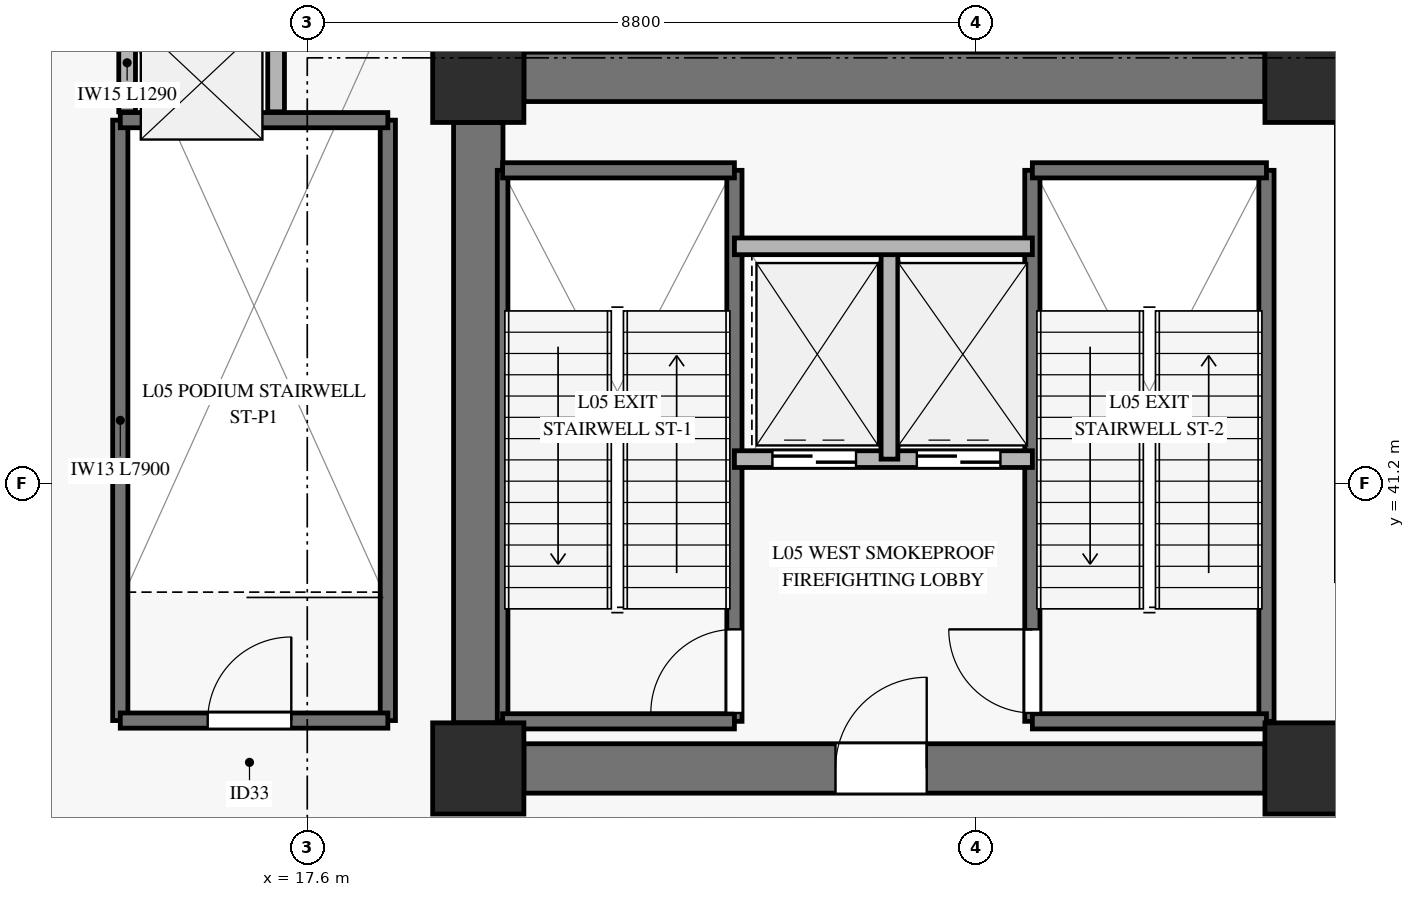
"""IFC4 building model, lengths in metres.
Left out: names, types, materials, properties, quantities, classifications, styles, units other than length and angle.
Written with IfcOpenShell. Run it as: python <this file> out.ifc"""

import sys

from ifc_helpers import new_model, si_unit, direction, frame, frame_2d, origin, origin_2d, place, context, subcontext, project, spatial, rectangle, extrude, source, transform, mapped, element, fill, save


model = new_model("IFC4")
c1 = context("Model", 3, precision=1e-05, world=origin(), true_north=direction((0.0, 1.0)))
c2 = subcontext(c1, "Body", "Model", "MODEL_VIEW")
j1 = project(units=[si_unit("LENGTHUNIT", "METRE"), si_unit("PLANEANGLEUNIT", "RADIAN")], contexts=[c1])
p1 = place(None, origin())
s1 = spatial("IfcSite", under=j1, at=p1, CompositionType="ELEMENT")
p2 = place(p1, origin())
s2 = spatial("IfcBuilding", under=s1, at=p2, CompositionType="ELEMENT")
p3 = place(p2, frame((0.0, 0.0, 20.2)))
s3 = spatial("IfcBuildingStorey", under=s2, at=p3, CompositionType="ELEMENT", Elevation=20.2)
m1 = source(origin(), c2, "Body", "SweptSolid", [
    extrude(rectangle(XDim=1.2, YDim=1.2, at=origin_2d()), origin(), (0.0, 0.0, 1.0), 4.98),
])
for number, where, z_axis, x_axis in (
    (1, (19.85, 37.45, 0.0), (0.0, 0.0, 1.0), (1.0, 0.0, 0.0)),
    (2, (19.85, 46.55, 0.0), (0.0, 0.0, 1.0), (1.0, 0.0, 0.0)),
    (3, (30.8, 37.45, 0.0), (0.0, 0.0, 1.0), (1.0, 0.0, 0.0)),
    (4, (30.8, 46.55, 0.0), (0.0, 0.0, 1.0), (1.0, 0.0, 0.0)),
):
    element("IfcColumn", number, at=place(p3, frame(where, z_axis=z_axis, x_axis=x_axis)), inside=s3, PredefinedType="PILASTER", context=c2, shape_type="MappedRepresentation", body=[
        mapped(m1, transform((0.0, 0.0, 0.0), x_axis=(1.0, 0.0, 0.0), y_axis=(0.0, 1.0, 0.0), z_axis=(0.0, 0.0, 1.0), scale=1.0)),
    ])
p4 = place(p3, frame((20.45, 46.55, 0.0), z_axis=(0.0, 0.0, 1.0), x_axis=(1.0, 0.0, 0.0)))
e5 = element("IfcWall", 5, at=p4, inside=s3, PredefinedType="SHEAR", context=c2, shape_type="SweptSolid", body=[
    extrude(rectangle(XDim=9.75, YDim=0.65, at=frame_2d((4.875, 0.0))), origin(), (0.0, 0.0, 1.0), 4.98),
])
p5 = place(p3, frame((20.45, 37.45, 0.0), z_axis=(0.0, 0.0, 1.0), x_axis=(1.0, 0.0, 0.0)))
e6 = element("IfcWall", 6, at=p5, inside=s3, PredefinedType="SHEAR", context=c2, shape_type="SweptSolid", body=[
    extrude(rectangle(XDim=9.75, YDim=0.65, at=frame_2d((4.875, 0.0))), origin(), (0.0, 0.0, 1.0), 4.98),
])
p6 = place(p5, frame((4.1, 0.0, 0.0)))
e7 = element("IfcOpeningElement", 7, at=p6, cuts=e6, PredefinedType="OPENING", context=c2, shape_type="SweptSolid", body=[
    extrude(rectangle(XDim=1.2, YDim=2.15, at=frame_2d((0.6, 1.075))), frame((0.0, 0.335, 0.0), z_axis=(0.0, -1.0, 0.0), x_axis=(1.0, 0.0, 0.0)), (0.0, 0.0, 1.0), 0.67),
])
p7 = place(p3, frame((19.85, 38.05, 0.0), z_axis=(0.0, 0.0, 1.0), x_axis=(0.0, 1.0, 0.0)))
e8 = element("IfcWall", 8, at=p7, inside=s3, PredefinedType="SHEAR", context=c2, shape_type="SweptSolid", body=[
    extrude(rectangle(XDim=7.9, YDim=0.65, at=frame_2d((3.95, 0.0))), origin(), (0.0, 0.0, 1.0), 4.98),
])
p8 = place(p3, frame((20.17, 38.07, 0.0), z_axis=(0.0, 0.0, 1.0), x_axis=(0.0, 1.0, 0.0)))
e9 = element("IfcWall", 9, at=p8, inside=s3, PredefinedType="SOLIDWALL", context=c2, shape_type="SweptSolid", body=[
    extrude(rectangle(XDim=7.25, YDim=0.14, at=frame_2d((3.625, 0.0))), origin(), (0.0, 0.0, 1.0), 5.2),
])
p9 = place(p3, frame((23.22, 38.07, 0.0), z_axis=(0.0, 0.0, 1.0), x_axis=(0.0, 1.0, 0.0)))
e10 = element("IfcWall", 10, at=p9, inside=s3, PredefinedType="SOLIDWALL", context=c2, shape_type="SweptSolid", body=[
    extrude(rectangle(XDim=7.25, YDim=0.2, at=frame_2d((3.625, 0.0))), origin(), (0.0, 0.0, 1.0), 5.2),
])
p10 = place(p9, frame((0.11, 0.0, 0.0)))
e11 = element("IfcOpeningElement", 11, at=p10, cuts=e10, PredefinedType="OPENING", context=c2, shape_type="SweptSolid", body=[
    extrude(rectangle(XDim=1.1, YDim=2.15, at=frame_2d((0.55, 1.075))), frame((0.0, 0.11, 0.0), z_axis=(0.0, -1.0, 0.0), x_axis=(1.0, 0.0, 0.0)), (0.0, 0.0, 1.0), 0.22),
])
for number, where, z_axis, x_axis in (
    (12, (20.17, 45.32, 0.0), (0.0, 0.0, 1.0), (1.0, 0.0, 0.0)),
    (13, (20.17, 38.07, 0.0), (0.0, 0.0, 1.0), (1.0, 0.0, 0.0)),
):
    element("IfcWall", number, at=place(p3, frame(where, z_axis=z_axis, x_axis=x_axis)), inside=s3, PredefinedType="SOLIDWALL", context=c2, shape_type="SweptSolid", body=[
        extrude(rectangle(XDim=3.05, YDim=0.2, at=frame_2d((1.525, 0.0))), origin(), (0.0, 0.0, 1.0), 5.2),
    ])
p11 = place(p3, frame((27.14, 38.07, 0.0), z_axis=(0.0, 0.0, 1.0), x_axis=(0.0, 1.0, 0.0)))
e14 = element("IfcWall", 14, at=p11, inside=s3, PredefinedType="SOLIDWALL", context=c2, shape_type="SweptSolid", body=[
    extrude(rectangle(XDim=7.25, YDim=0.2, at=frame_2d((3.625, 0.0))), origin(), (0.0, 0.0, 1.0), 5.2),
])
p12 = place(p11, frame((0.11, 0.0, 0.0)))
e15 = element("IfcOpeningElement", 15, at=p12, cuts=e14, PredefinedType="OPENING", context=c2, shape_type="SweptSolid", body=[
    extrude(rectangle(XDim=1.1, YDim=2.15, at=frame_2d((0.55, 1.075))), frame((0.0, 0.11, 0.0), z_axis=(0.0, -1.0, 0.0), x_axis=(1.0, 0.0, 0.0)), (0.0, 0.0, 1.0), 0.22),
])
p13 = place(p3, frame((30.22, 38.07, 0.0), z_axis=(0.0, 0.0, 1.0), x_axis=(0.0, 1.0, 0.0)))
e16 = element("IfcWall", 16, at=p13, inside=s3, PredefinedType="SOLIDWALL", context=c2, shape_type="SweptSolid", body=[
    extrude(rectangle(XDim=7.25, YDim=0.2, at=frame_2d((3.625, 0.0))), origin(), (0.0, 0.0, 1.0), 5.2),
])
for number, where, z_axis, x_axis in (
    (17, (27.14, 45.32, 0.0), (0.0, 0.0, 1.0), (1.0, 0.0, 0.0)),
    (18, (27.14, 38.07, 0.0), (0.0, 0.0, 1.0), (1.0, 0.0, 0.0)),
):
    element("IfcWall", number, at=place(p3, frame(where, z_axis=z_axis, x_axis=x_axis)), inside=s3, PredefinedType="SOLIDWALL", context=c2, shape_type="SweptSolid", body=[
        extrude(rectangle(XDim=3.08, YDim=0.2, at=frame_2d((1.54, 0.0))), origin(), (0.0, 0.0, 1.0), 5.2),
    ])
p14 = place(p3, frame((23.22, 41.52, 0.0), z_axis=(0.0, 0.0, 1.0), x_axis=(1.0, 0.0, 0.0)))
e19 = element("IfcWall", 19, at=p14, inside=s3, PredefinedType="SOLIDWALL", context=c2, shape_type="SweptSolid", body=[
    extrude(rectangle(XDim=3.92, YDim=0.22, at=frame_2d((1.96, 0.0))), origin(), (0.0, 0.0, 1.0), 4.98),
])
p15 = place(p14, frame((0.5, 0.0, 0.0)))
e20 = element("IfcOpeningElement", 20, at=p15, cuts=e19, PredefinedType="OPENING", context=c2, shape_type="SweptSolid", body=[
    extrude(rectangle(XDim=1.1, YDim=2.2, at=frame_2d((0.55, 1.1))), frame((0.0, 0.12, 0.0), z_axis=(0.0, -1.0, 0.0), x_axis=(1.0, 0.0, 0.0)), (0.0, 0.0, 1.0), 0.24),
])
p16 = place(p14, frame((2.4, 0.0, 0.0)))
e21 = element("IfcOpeningElement", 21, at=p16, cuts=e19, PredefinedType="OPENING", context=c2, shape_type="SweptSolid", body=[
    extrude(rectangle(XDim=1.1, YDim=2.2, at=frame_2d((0.55, 1.1))), frame((0.0, 0.12, 0.0), z_axis=(0.0, -1.0, 0.0), x_axis=(1.0, 0.0, 0.0)), (0.0, 0.0, 1.0), 0.24),
])
p17 = place(p3, frame((25.26, 41.52, 0.0), z_axis=(0.0, 0.0, 1.0), x_axis=(0.0, 1.0, 0.0)))
e22 = element("IfcWall", 22, at=p17, inside=s3, PredefinedType="SOLIDWALL", context=c2, shape_type="SweptSolid", body=[
    extrude(rectangle(XDim=2.8, YDim=0.22, at=frame_2d((1.4, 0.0))), origin(), (0.0, 0.0, 1.0), 4.98),
])
p18 = place(p3, frame((23.22, 44.32, 0.0), z_axis=(0.0, 0.0, 1.0), x_axis=(1.0, 0.0, 0.0)))
e23 = element("IfcWall", 23, at=p18, inside=s3, PredefinedType="SOLIDWALL", context=c2, shape_type="SweptSolid", body=[
    extrude(rectangle(XDim=3.92, YDim=0.22, at=frame_2d((1.96, 0.0))), origin(), (0.0, 0.0, 1.0), 4.98),
])
for number, where, z_axis, x_axis in (
    (24, (15.14, 38.08, 0.0), (0.0, 0.0, 1.0), (0.0, 1.0, 0.0)),
    (25, (18.66, 38.08, 0.0), (0.0, 0.0, 1.0), (0.0, 1.0, 0.0)),
):
    element("IfcWall", number, at=place(p3, frame(where, z_axis=z_axis, x_axis=x_axis)), inside=s3, PredefinedType="SOLIDWALL", context=c2, shape_type="SweptSolid", body=[
        extrude(rectangle(XDim=7.9, YDim=0.2, at=frame_2d((3.95, 0.0))), origin(), (0.0, 0.0, 1.0), 5.2),
    ])
p19 = place(p3, frame((15.14, 45.98, 0.0), z_axis=(0.0, 0.0, 1.0), x_axis=(1.0, 0.0, 0.0)))
e26 = element("IfcWall", 26, at=p19, inside=s3, PredefinedType="SOLIDWALL", context=c2, shape_type="SweptSolid", body=[
    extrude(rectangle(XDim=3.52, YDim=0.2, at=frame_2d((1.76, 0.0))), origin(), (0.0, 0.0, 1.0), 5.2),
])
p20 = place(p3, frame((15.14, 38.08, 0.0), z_axis=(0.0, 0.0, 1.0), x_axis=(1.0, 0.0, 0.0)))
e27 = element("IfcWall", 27, at=p20, inside=s3, PredefinedType="SOLIDWALL", context=c2, shape_type="SweptSolid", body=[
    extrude(rectangle(XDim=3.52, YDim=0.2, at=frame_2d((1.76, 0.0))), origin(), (0.0, 0.0, 1.0), 5.2),
])
p21 = place(p20, frame((1.15, 0.0, 0.0)))
e28 = element("IfcOpeningElement", 28, at=p21, cuts=e27, PredefinedType="OPENING", context=c2, shape_type="SweptSolid", body=[
    extrude(rectangle(XDim=1.1, YDim=2.15, at=frame_2d((0.55, 1.075))), frame((0.0, 0.11, 0.0), z_axis=(0.0, -1.0, 0.0), x_axis=(1.0, 0.0, 0.0)), (0.0, 0.0, 1.0), 0.22),
])
for number, where, z_axis, x_axis in (
    (29, (15.23, 46.09, 0.0), (0.0, 0.0, 1.0), (0.0, 1.0, 0.0)),
    (30, (17.19, 46.09, 0.0), (0.0, 0.0, 1.0), (0.0, 1.0, 0.0)),
):
    element("IfcWall", number, at=place(p3, frame(where, z_axis=z_axis, x_axis=x_axis)), inside=s3, PredefinedType="SOLIDWALL", context=c2, shape_type="SweptSolid", body=[
        extrude(rectangle(XDim=1.29, YDim=0.22, at=frame_2d((0.645, 0.0))), origin(), (0.0, 0.0, 1.0), 4.98),
    ])
m2 = source(origin(), c2, "Body", "SweptSolid", [
    extrude(rectangle(XDim=1.1, YDim=2.15, at=frame_2d((0.55, 1.075))), frame((0.0, 0.025, 0.0), z_axis=(0.0, -1.0, 0.0), x_axis=(1.0, 0.0, 0.0)), (0.0, 0.0, 1.0), 0.05),
])
p22 = place(p10, origin())
e31 = element("IfcDoor", 31, at=p22, inside=s3, OperationType="SINGLE_SWING_LEFT", PredefinedType="DOOR", context=c2, shape_type="MappedRepresentation", body=[
    mapped(m2, transform((0.0, 0.0, 0.0), x_axis=(1.0, 0.0, 0.0), y_axis=(0.0, 1.0, 0.0), z_axis=(0.0, 0.0, 1.0), scale=1.0)),
])
fill(e11, e31)
p23 = place(p12, origin())
e32 = element("IfcDoor", 32, at=p23, inside=s3, OperationType="SINGLE_SWING_RIGHT", PredefinedType="DOOR", context=c2, shape_type="MappedRepresentation", body=[
    mapped(m2, transform((0.0, 0.0, 0.0), x_axis=(1.0, 0.0, 0.0), y_axis=(0.0, 1.0, 0.0), z_axis=(0.0, 0.0, 1.0), scale=1.0)),
])
fill(e15, e32)
m3 = source(origin(), c2, "Body", "SweptSolid", [
    extrude(rectangle(XDim=1.1, YDim=2.2, at=frame_2d((0.55, 1.1))), frame((0.0, 0.025, 0.0), z_axis=(0.0, -1.0, 0.0), x_axis=(1.0, 0.0, 0.0)), (0.0, 0.0, 1.0), 0.05),
])
p24 = place(p15, origin())
e33 = element("IfcDoor", 33, at=p24, inside=s3, OperationType="SLIDING_TO_LEFT", PredefinedType="DOOR", context=c2, shape_type="MappedRepresentation", body=[
    mapped(m3, transform((0.0, 0.0, 0.0), x_axis=(1.0, 0.0, 0.0), y_axis=(0.0, 1.0, 0.0), z_axis=(0.0, 0.0, 1.0), scale=1.0)),
])
fill(e20, e33)
p25 = place(p16, origin())
e34 = element("IfcDoor", 34, at=p25, inside=s3, OperationType="SLIDING_TO_LEFT", PredefinedType="DOOR", context=c2, shape_type="MappedRepresentation", body=[
    mapped(m3, transform((0.0, 0.0, 0.0), x_axis=(1.0, 0.0, 0.0), y_axis=(0.0, 1.0, 0.0), z_axis=(0.0, 0.0, 1.0), scale=1.0)),
])
fill(e21, e34)
m4 = source(origin(), c2, "Body", "SweptSolid", [
    extrude(rectangle(XDim=1.2, YDim=2.15, at=frame_2d((0.6, 1.075))), frame((0.0, 0.025, 0.0), z_axis=(0.0, -1.0, 0.0), x_axis=(1.0, 0.0, 0.0)), (0.0, 0.0, 1.0), 0.05),
])
p26 = place(p6, origin())
e35 = element("IfcDoor", 35, at=p26, inside=s3, OperationType="SINGLE_SWING_RIGHT", PredefinedType="DOOR", context=c2, shape_type="MappedRepresentation", body=[
    mapped(m4, transform((0.0, 0.0, 0.0), x_axis=(1.0, 0.0, 0.0), y_axis=(0.0, 1.0, 0.0), z_axis=(0.0, 0.0, 1.0), scale=1.0)),
])
fill(e7, e35)
p27 = place(p21, origin())
e36 = element("IfcDoor", 36, at=p27, inside=s3, OperationType="SINGLE_SWING_RIGHT", PredefinedType="DOOR", context=c2, shape_type="MappedRepresentation", body=[
    mapped(m2, transform((0.0, 0.0, 0.0), x_axis=(1.0, 0.0, 0.0), y_axis=(0.0, 1.0, 0.0), z_axis=(0.0, 0.0, 1.0), scale=1.0)),
])
fill(e28, e36)
save(model, sys.argv[1])
